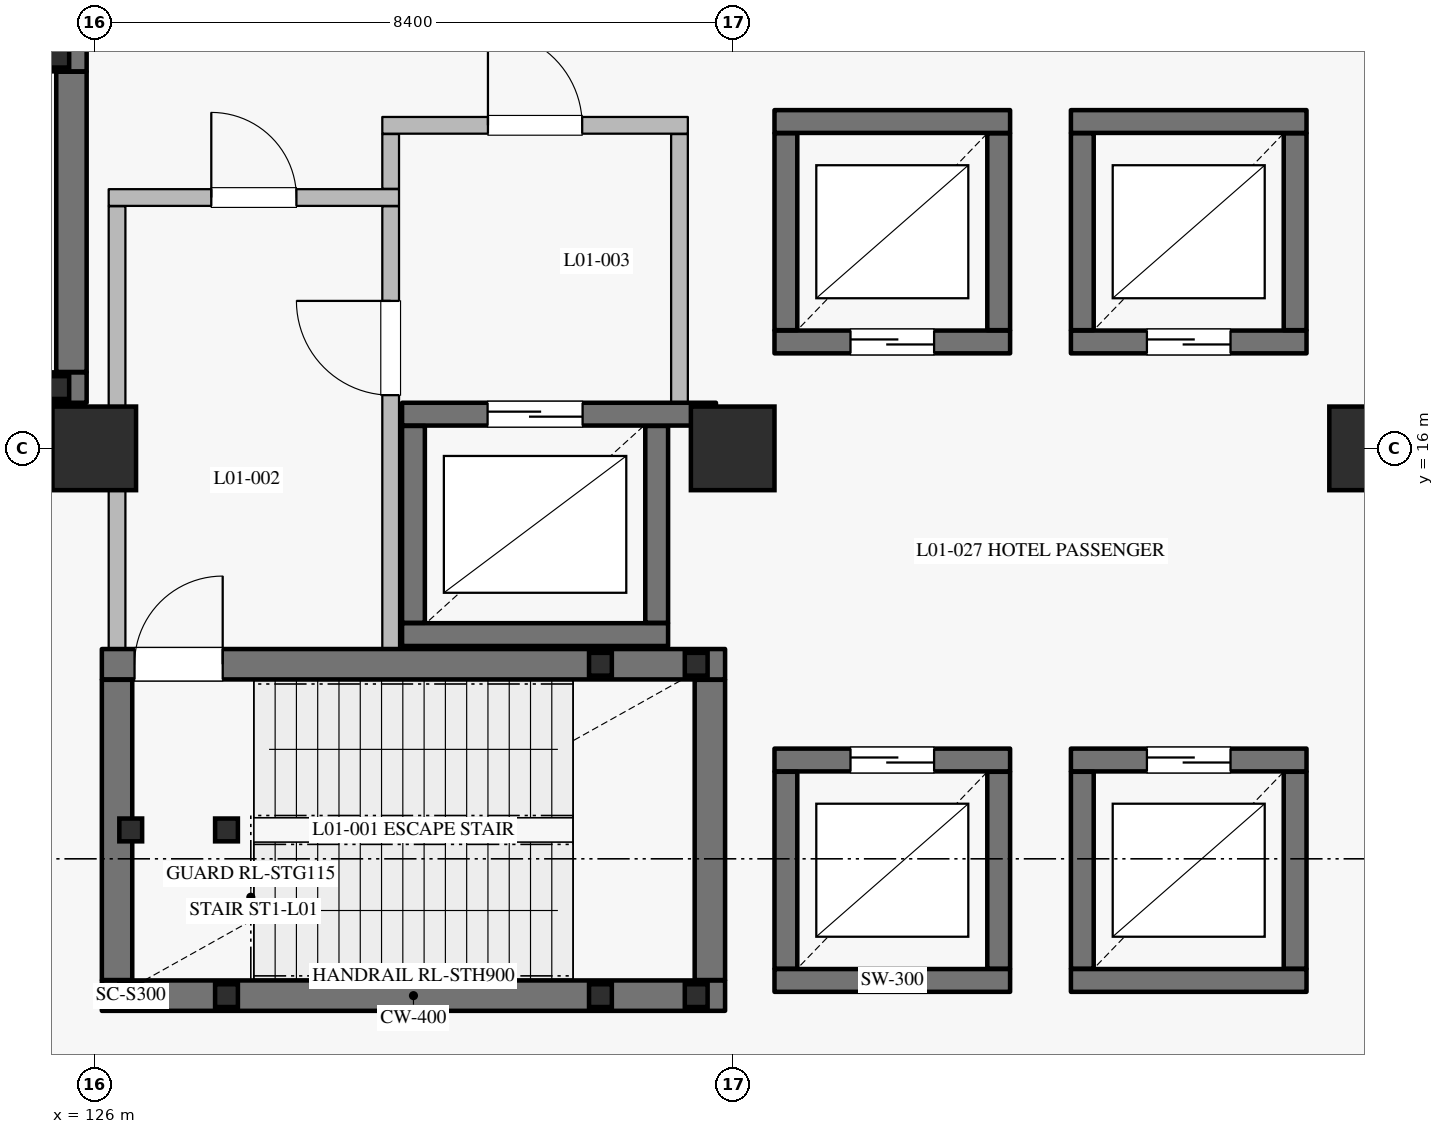
"""IFC4 building model, lengths in metres.
Left out: names, types, materials, properties, quantities, classifications, styles, units other than length and angle.
Written with IfcOpenShell. Run it as: python <this file> out.ifc"""

import sys

from ifc_helpers import new_model, si_unit, direction, frame, frame_2d, origin, origin_2d, place, context, subcontext, project, spatial, rectangle, hollow_rectangle, circle, extrude, element, fill, save


model = new_model("IFC4")
c1 = context("Model", 3, precision=1e-05, world=origin(), true_north=direction((0.0, 1.0)))
c2 = subcontext(c1, "Body", "Model", "MODEL_VIEW")
j1 = project(units=[si_unit("LENGTHUNIT", "METRE"), si_unit("PLANEANGLEUNIT", "RADIAN")], contexts=[c1])
p1 = place(None, origin())
s1 = spatial("IfcSite", under=j1, at=p1, CompositionType="ELEMENT")
p2 = place(p1, origin())
s2 = spatial("IfcBuilding", under=s1, at=p2, CompositionType="ELEMENT")
p3 = place(p2, frame((0.0, 0.0, 6.0)))
s3 = spatial("IfcBuildingStorey", under=s2, at=p3, CompositionType="ELEMENT", Elevation=6.0)
for number, where, z_axis, x_axis in (
    (1, (126.0, 16.0, 0.0), (0.0, 0.0, 1.0), (1.0, 0.0, 0.0)),
    (2, (134.4, 16.0, 0.0), (0.0, 0.0, 1.0), (1.0, 0.0, 0.0)),
    (3, (142.8, 16.0, 0.0), (0.0, 0.0, 1.0), (1.0, 0.0, 0.0)),
):
    element("IfcColumn", number, at=place(p3, frame(where, z_axis=z_axis, x_axis=x_axis)), inside=s3, PredefinedType="COLUMN", context=c2, shape_type="SweptSolid", body=[
        extrude(circle(Radius=0.55, at=origin_2d()), origin(), (0.0, 0.0, 1.0), 5.4),
    ])
p4 = place(p3, frame((134.95, 17.4, 0.0), z_axis=(0.0, 0.0, 1.0), x_axis=(1.0, 0.0, 0.0)))
e4 = element("IfcWall", 4, at=p4, inside=s3, PredefinedType="SHEAR", context=c2, shape_type="SweptSolid", body=[
    extrude(rectangle(XDim=3.1, YDim=0.3, at=frame_2d((1.55, 0.0))), origin(), (0.0, 0.0, 1.0), 5.045),
])
p5 = place(p4, frame((1.0, 0.0, 0.0)))
e5 = element("IfcOpeningElement", 5, at=p5, cuts=e4, PredefinedType="OPENING", context=c2, shape_type="SweptSolid", body=[
    extrude(rectangle(XDim=1.1, YDim=2.2, at=frame_2d((0.55, 1.1))), frame((0.0, 0.16, 0.0), z_axis=(0.0, -1.0, 0.0), x_axis=(1.0, 0.0, 0.0)), (0.0, 0.0, 1.0), 0.32),
])
p6 = place(p3, frame((137.9, 17.555, 0.0), z_axis=(0.0, 0.0, 1.0), x_axis=(0.0, 1.0, 0.0)))
e6 = element("IfcWall", 6, at=p6, inside=s3, PredefinedType="SHEAR", context=c2, shape_type="SweptSolid", body=[
    extrude(rectangle(XDim=2.59, YDim=0.3, at=frame_2d((1.295, 0.0))), origin(), (0.0, 0.0, 1.0), 5.045),
])
p7 = place(p3, frame((138.05, 20.3, 0.0), z_axis=(0.0, 0.0, 1.0), x_axis=(-1.0, 0.0, 0.0)))
e7 = element("IfcWall", 7, at=p7, inside=s3, PredefinedType="SHEAR", context=c2, shape_type="SweptSolid", body=[
    extrude(rectangle(XDim=3.1, YDim=0.3, at=frame_2d((1.55, 0.0))), origin(), (0.0, 0.0, 1.0), 5.045),
])
p8 = place(p3, frame((135.1, 20.145, 0.0), z_axis=(0.0, 0.0, 1.0), x_axis=(0.0, -1.0, 0.0)))
e8 = element("IfcWall", 8, at=p8, inside=s3, PredefinedType="SHEAR", context=c2, shape_type="SweptSolid", body=[
    extrude(rectangle(XDim=2.59, YDim=0.3, at=frame_2d((1.295, 0.0))), origin(), (0.0, 0.0, 1.0), 5.045),
])
p9 = place(p3, frame((138.85, 17.4, 0.0), z_axis=(0.0, 0.0, 1.0), x_axis=(1.0, 0.0, 0.0)))
e9 = element("IfcWall", 9, at=p9, inside=s3, PredefinedType="SHEAR", context=c2, shape_type="SweptSolid", body=[
    extrude(rectangle(XDim=3.1, YDim=0.3, at=frame_2d((1.55, 0.0))), origin(), (0.0, 0.0, 1.0), 5.045),
])
p10 = place(p9, frame((1.0, 0.0, 0.0)))
e10 = element("IfcOpeningElement", 10, at=p10, cuts=e9, PredefinedType="OPENING", context=c2, shape_type="SweptSolid", body=[
    extrude(rectangle(XDim=1.1, YDim=2.2, at=frame_2d((0.55, 1.1))), frame((0.0, 0.16, 0.0), z_axis=(0.0, -1.0, 0.0), x_axis=(1.0, 0.0, 0.0)), (0.0, 0.0, 1.0), 0.32),
])
p11 = place(p3, frame((141.8, 17.555, 0.0), z_axis=(0.0, 0.0, 1.0), x_axis=(0.0, 1.0, 0.0)))
e11 = element("IfcWall", 11, at=p11, inside=s3, PredefinedType="SHEAR", context=c2, shape_type="SweptSolid", body=[
    extrude(rectangle(XDim=2.59, YDim=0.3, at=frame_2d((1.295, 0.0))), origin(), (0.0, 0.0, 1.0), 5.045),
])
p12 = place(p3, frame((141.95, 20.3, 0.0), z_axis=(0.0, 0.0, 1.0), x_axis=(-1.0, 0.0, 0.0)))
e12 = element("IfcWall", 12, at=p12, inside=s3, PredefinedType="SHEAR", context=c2, shape_type="SweptSolid", body=[
    extrude(rectangle(XDim=3.1, YDim=0.3, at=frame_2d((1.55, 0.0))), origin(), (0.0, 0.0, 1.0), 5.045),
])
p13 = place(p3, frame((139.0, 20.145, 0.0), z_axis=(0.0, 0.0, 1.0), x_axis=(0.0, -1.0, 0.0)))
e13 = element("IfcWall", 13, at=p13, inside=s3, PredefinedType="SHEAR", context=c2, shape_type="SweptSolid", body=[
    extrude(rectangle(XDim=2.59, YDim=0.3, at=frame_2d((1.295, 0.0))), origin(), (0.0, 0.0, 1.0), 5.045),
])
p14 = place(p3, frame((134.95, 9.0, 0.0), z_axis=(0.0, 0.0, 1.0), x_axis=(1.0, 0.0, 0.0)))
e14 = element("IfcWall", 14, at=p14, inside=s3, PredefinedType="SHEAR", context=c2, shape_type="SweptSolid", body=[
    extrude(rectangle(XDim=3.1, YDim=0.3, at=frame_2d((1.55, 0.0))), origin(), (0.0, 0.0, 1.0), 5.045),
])
p15 = place(p3, frame((137.9, 9.155, 0.0), z_axis=(0.0, 0.0, 1.0), x_axis=(0.0, 1.0, 0.0)))
e15 = element("IfcWall", 15, at=p15, inside=s3, PredefinedType="SHEAR", context=c2, shape_type="SweptSolid", body=[
    extrude(rectangle(XDim=2.59, YDim=0.3, at=frame_2d((1.295, 0.0))), origin(), (0.0, 0.0, 1.0), 5.045),
])
p16 = place(p3, frame((138.05, 11.9, 0.0), z_axis=(0.0, 0.0, 1.0), x_axis=(-1.0, 0.0, 0.0)))
e16 = element("IfcWall", 16, at=p16, inside=s3, PredefinedType="SHEAR", context=c2, shape_type="SweptSolid", body=[
    extrude(rectangle(XDim=3.1, YDim=0.3, at=frame_2d((1.55, 0.0))), origin(), (0.0, 0.0, 1.0), 5.045),
])
p17 = place(p16, frame((1.0, 0.0, 0.0)))
e17 = element("IfcOpeningElement", 17, at=p17, cuts=e16, PredefinedType="OPENING", context=c2, shape_type="SweptSolid", body=[
    extrude(rectangle(XDim=1.1, YDim=2.2, at=frame_2d((0.55, 1.1))), frame((0.0, 0.16, 0.0), z_axis=(0.0, -1.0, 0.0), x_axis=(1.0, 0.0, 0.0)), (0.0, 0.0, 1.0), 0.32),
])
p18 = place(p3, frame((135.1, 11.745, 0.0), z_axis=(0.0, 0.0, 1.0), x_axis=(0.0, -1.0, 0.0)))
e18 = element("IfcWall", 18, at=p18, inside=s3, PredefinedType="SHEAR", context=c2, shape_type="SweptSolid", body=[
    extrude(rectangle(XDim=2.59, YDim=0.3, at=frame_2d((1.295, 0.0))), origin(), (0.0, 0.0, 1.0), 5.045),
])
p19 = place(p3, frame((138.85, 9.0, 0.0), z_axis=(0.0, 0.0, 1.0), x_axis=(1.0, 0.0, 0.0)))
e19 = element("IfcWall", 19, at=p19, inside=s3, PredefinedType="SHEAR", context=c2, shape_type="SweptSolid", body=[
    extrude(rectangle(XDim=3.1, YDim=0.3, at=frame_2d((1.55, 0.0))), origin(), (0.0, 0.0, 1.0), 5.045),
])
p20 = place(p3, frame((141.8, 9.155, 0.0), z_axis=(0.0, 0.0, 1.0), x_axis=(0.0, 1.0, 0.0)))
e20 = element("IfcWall", 20, at=p20, inside=s3, PredefinedType="SHEAR", context=c2, shape_type="SweptSolid", body=[
    extrude(rectangle(XDim=2.59, YDim=0.3, at=frame_2d((1.295, 0.0))), origin(), (0.0, 0.0, 1.0), 5.045),
])
p21 = place(p3, frame((141.95, 11.9, 0.0), z_axis=(0.0, 0.0, 1.0), x_axis=(-1.0, 0.0, 0.0)))
e21 = element("IfcWall", 21, at=p21, inside=s3, PredefinedType="SHEAR", context=c2, shape_type="SweptSolid", body=[
    extrude(rectangle(XDim=3.1, YDim=0.3, at=frame_2d((1.55, 0.0))), origin(), (0.0, 0.0, 1.0), 5.045),
])
p22 = place(p21, frame((1.0, 0.0, 0.0)))
e22 = element("IfcOpeningElement", 22, at=p22, cuts=e21, PredefinedType="OPENING", context=c2, shape_type="SweptSolid", body=[
    extrude(rectangle(XDim=1.1, YDim=2.2, at=frame_2d((0.55, 1.1))), frame((0.0, 0.16, 0.0), z_axis=(0.0, -1.0, 0.0), x_axis=(1.0, 0.0, 0.0)), (0.0, 0.0, 1.0), 0.32),
])
p23 = place(p3, frame((139.0, 11.745, 0.0), z_axis=(0.0, 0.0, 1.0), x_axis=(0.0, -1.0, 0.0)))
e23 = element("IfcWall", 23, at=p23, inside=s3, PredefinedType="SHEAR", context=c2, shape_type="SweptSolid", body=[
    extrude(rectangle(XDim=2.59, YDim=0.3, at=frame_2d((1.295, 0.0))), origin(), (0.0, 0.0, 1.0), 5.045),
])
p24 = place(p3, frame((130.05, 13.55, 0.0), z_axis=(0.0, 0.0, 1.0), x_axis=(1.0, 0.0, 0.0)))
e24 = element("IfcWall", 24, at=p24, inside=s3, PredefinedType="SHEAR", context=c2, shape_type="SweptSolid", body=[
    extrude(rectangle(XDim=3.5, YDim=0.3, at=frame_2d((1.75, 0.0))), origin(), (0.0, 0.0, 1.0), 5.045),
])
p25 = place(p3, frame((133.4, 13.705, 0.0), z_axis=(0.0, 0.0, 1.0), x_axis=(0.0, 1.0, 0.0)))
e25 = element("IfcWall", 25, at=p25, inside=s3, PredefinedType="SHEAR", context=c2, shape_type="SweptSolid", body=[
    extrude(rectangle(XDim=2.59, YDim=0.3, at=frame_2d((1.295, 0.0))), origin(), (0.0, 0.0, 1.0), 5.045),
])
p26 = place(p3, frame((134.18, 16.45, 0.0), z_axis=(0.0, 0.0, 1.0), x_axis=(-1.0, 0.0, 0.0)))
e26 = element("IfcWall", 26, at=p26, inside=s3, PredefinedType="SHEAR", context=c2, shape_type="SweptSolid", body=[
    extrude(rectangle(XDim=4.13, YDim=0.3, at=frame_2d((2.065, 0.0))), origin(), (0.0, 0.0, 1.0), 5.045),
])
p27 = place(p26, frame((1.755, 0.0, 0.0)))
e27 = element("IfcOpeningElement", 27, at=p27, cuts=e26, PredefinedType="OPENING", context=c2, shape_type="SweptSolid", body=[
    extrude(rectangle(XDim=1.25, YDim=2.25, at=frame_2d((0.625, 1.125))), frame((0.0, 0.16, 0.0), z_axis=(0.0, -1.0, 0.0), x_axis=(1.0, 0.0, 0.0)), (0.0, 0.0, 1.0), 0.32),
])
p28 = place(p3, frame((130.2, 16.295, 0.0), z_axis=(0.0, 0.0, 1.0), x_axis=(0.0, -1.0, 0.0)))
e28 = element("IfcWall", 28, at=p28, inside=s3, PredefinedType="SHEAR", context=c2, shape_type="SweptSolid", body=[
    extrude(rectangle(XDim=2.59, YDim=0.3, at=frame_2d((1.295, 0.0))), origin(), (0.0, 0.0, 1.0), 5.045),
])
p29 = place(p3, frame((126.1, 8.8, 0.0), z_axis=(0.0, 0.0, 1.0), x_axis=(1.0, 0.0, 0.0)))
e29 = element("IfcWall", 29, at=p29, inside=s3, PredefinedType="SHEAR", context=c2, shape_type="SweptSolid", body=[
    extrude(rectangle(XDim=8.2, YDim=0.4, at=frame_2d((4.1, 0.0))), origin(), (0.0, 0.0, 1.0), 5.045),
])
p30 = place(p3, frame((134.1, 9.005, 0.0), z_axis=(0.0, 0.0, 1.0), x_axis=(0.0, 1.0, 0.0)))
e30 = element("IfcWall", 30, at=p30, inside=s3, PredefinedType="SHEAR", context=c2, shape_type="SweptSolid", body=[
    extrude(rectangle(XDim=3.95, YDim=0.4, at=frame_2d((1.975, 0.0))), origin(), (0.0, 0.0, 1.0), 5.045),
])
p31 = place(p3, frame((126.1, 13.16, 0.0), z_axis=(0.0, 0.0, 1.0), x_axis=(1.0, 0.0, 0.0)))
e31 = element("IfcWall", 31, at=p31, inside=s3, PredefinedType="SHEAR", context=c2, shape_type="SweptSolid", body=[
    extrude(rectangle(XDim=8.2, YDim=0.4, at=frame_2d((4.1, 0.0))), origin(), (0.0, 0.0, 1.0), 5.045),
])
p32 = place(p31, frame((0.43, 0.0, 0.0)))
e32 = element("IfcOpeningElement", 32, at=p32, cuts=e31, PredefinedType="OPENING", context=c2, shape_type="SweptSolid", body=[
    extrude(rectangle(XDim=1.16, YDim=2.2, at=frame_2d((0.58, 1.1))), frame((0.0, 0.21, 0.0), z_axis=(0.0, -1.0, 0.0), x_axis=(1.0, 0.0, 0.0)), (0.0, 0.0, 1.0), 0.42),
])
p33 = place(p3, frame((126.3, 9.005, 0.0), z_axis=(0.0, 0.0, 1.0), x_axis=(0.0, 1.0, 0.0)))
e33 = element("IfcWall", 33, at=p33, inside=s3, PredefinedType="SHEAR", context=c2, shape_type="SweptSolid", body=[
    extrude(rectangle(XDim=3.95, YDim=0.4, at=frame_2d((1.975, 0.0))), origin(), (0.0, 0.0, 1.0), 5.045),
])
p34 = place(p3, frame((126.3, 13.365, 0.0), z_axis=(0.0, 0.0, 1.0), x_axis=(0.0, 1.0, 0.0)))
e34 = element("IfcWall", 34, at=p34, inside=s3, PredefinedType="PARTITIONING", context=c2, shape_type="SweptSolid", body=[
    extrude(rectangle(XDim=5.82, YDim=0.22, at=frame_2d((2.91, 0.0))), origin(), (0.0, 0.0, 1.0), 3.45),
])
p35 = place(p3, frame((126.19, 19.3, 0.0), z_axis=(0.0, 0.0, 1.0), x_axis=(1.0, 0.0, 0.0)))
e35 = element("IfcWall", 35, at=p35, inside=s3, PredefinedType="PARTITIONING", context=c2, shape_type="SweptSolid", body=[
    extrude(rectangle(XDim=3.82, YDim=0.22, at=frame_2d((1.91, 0.0))), origin(), (0.0, 0.0, 1.0), 5.045),
])
p36 = place(p35, frame((1.35, 0.0, 0.0)))
e36 = element("IfcOpeningElement", 36, at=p36, cuts=e35, PredefinedType="OPENING", context=c2, shape_type="SweptSolid", body=[
    extrude(rectangle(XDim=1.12, YDim=2.2, at=frame_2d((0.56, 1.1))), frame((0.0, 0.12, 0.0), z_axis=(0.0, -1.0, 0.0), x_axis=(1.0, 0.0, 0.0)), (0.0, 0.0, 1.0), 0.24),
])
p37 = place(p3, frame((129.9, 13.365, 0.0), z_axis=(0.0, 0.0, 1.0), x_axis=(0.0, 1.0, 0.0)))
e37 = element("IfcWall", 37, at=p37, inside=s3, PredefinedType="PARTITIONING", context=c2, shape_type="SweptSolid", body=[
    extrude(rectangle(XDim=5.82, YDim=0.22, at=frame_2d((2.91, 0.0))), origin(), (0.0, 0.0, 1.0), 5.045),
])
p38 = place(p37, frame((3.335, 0.0, 0.0)))
e38 = element("IfcOpeningElement", 38, at=p38, cuts=e37, PredefinedType="OPENING", context=c2, shape_type="SweptSolid", body=[
    extrude(rectangle(XDim=1.24, YDim=2.2, at=frame_2d((0.62, 1.1))), frame((0.0, 0.12, 0.0), z_axis=(0.0, -1.0, 0.0), x_axis=(1.0, 0.0, 0.0)), (0.0, 0.0, 1.0), 0.24),
])
p39 = place(p3, frame((129.9, 19.415, 0.0), z_axis=(0.0, 0.0, 1.0), x_axis=(0.0, 1.0, 0.0)))
e39 = element("IfcWall", 39, at=p39, inside=s3, PredefinedType="PARTITIONING", context=c2, shape_type="SweptSolid", body=[
    extrude(rectangle(XDim=0.72, YDim=0.22, at=frame_2d((0.36, 0.0))), origin(), (0.0, 0.0, 1.0), 5.045),
])
p40 = place(p3, frame((133.7, 16.605, 0.0), z_axis=(0.0, 0.0, 1.0), x_axis=(0.0, 1.0, 0.0)))
e40 = element("IfcWall", 40, at=p40, inside=s3, PredefinedType="PARTITIONING", context=c2, shape_type="SweptSolid", body=[
    extrude(rectangle(XDim=3.53, YDim=0.22, at=frame_2d((1.765, 0.0))), origin(), (0.0, 0.0, 1.0), 5.045),
])
p41 = place(p3, frame((129.79, 20.25, 0.0), z_axis=(0.0, 0.0, 1.0), x_axis=(1.0, 0.0, 0.0)))
e41 = element("IfcWall", 41, at=p41, inside=s3, PredefinedType="PARTITIONING", context=c2, shape_type="SweptSolid", body=[
    extrude(rectangle(XDim=4.02, YDim=0.22, at=frame_2d((2.01, 0.0))), origin(), (0.0, 0.0, 1.0), 5.045),
])
p42 = place(p41, frame((1.39, 0.0, 0.0)))
e42 = element("IfcOpeningElement", 42, at=p42, cuts=e41, PredefinedType="OPENING", context=c2, shape_type="SweptSolid", body=[
    extrude(rectangle(XDim=1.24, YDim=2.2, at=frame_2d((0.62, 1.1))), frame((0.0, 0.12, 0.0), z_axis=(0.0, -1.0, 0.0), x_axis=(1.0, 0.0, 0.0)), (0.0, 0.0, 1.0), 0.24),
])
for number, where, z_axis, x_axis in (
    (43, (126.48, 8.8, 0.0), (0.0, 0.0, 1.0), (1.0, 0.0, 0.0)),
    (44, (126.48, 10.98, 0.0), (0.0, 0.0, 1.0), (1.0, 0.0, 0.0)),
    (45, (127.74, 8.8, 0.0), (0.0, 0.0, 1.0), (1.0, 0.0, 0.0)),
    (46, (127.74, 10.98, 0.0), (0.0, 0.0, 1.0), (1.0, 0.0, 0.0)),
):
    element("IfcColumn", number, at=place(p3, frame(where, z_axis=z_axis, x_axis=x_axis)), inside=s3, PredefinedType="COLUMN", context=c2, shape_type="SweptSolid", body=[
        extrude(hollow_rectangle(XDim=0.3, YDim=0.3, WallThickness=0.012, at=origin_2d()), origin(), (0.0, 0.0, 1.0), 5.22),
    ])
for number, where, z_axis, x_axis in (
    (47, (132.66, 8.8, -3.0), (0.0, 0.0, 1.0), (1.0, 0.0, 0.0)),
    (48, (132.66, 13.16, -3.0), (0.0, 0.0, 1.0), (1.0, 0.0, 0.0)),
    (49, (133.92, 8.8, -3.0), (0.0, 0.0, 1.0), (1.0, 0.0, 0.0)),
    (50, (133.92, 13.16, -3.0), (0.0, 0.0, 1.0), (1.0, 0.0, 0.0)),
):
    element("IfcColumn", number, at=place(p3, frame(where, z_axis=z_axis, x_axis=x_axis)), inside=s3, PredefinedType="COLUMN", context=c2, shape_type="SweptSolid", body=[
        extrude(hollow_rectangle(XDim=0.3, YDim=0.3, WallThickness=0.012, at=origin_2d()), origin(), (0.0, 0.0, 1.0), 5.52),
    ])
p43 = place(p3, frame((117.7, 16.8, 0.0), z_axis=(0.0, 0.0, 1.0), x_axis=(1.0, 0.0, 0.0)))
e51 = element("IfcWall", 51, at=p43, inside=s3, PredefinedType="SHEAR", context=c2, shape_type="SweptSolid", body=[
    extrude(rectangle(XDim=8.2, YDim=0.4, at=frame_2d((4.1, 0.0))), origin(), (0.0, 0.0, 1.0), 5.045),
])
p44 = place(p3, frame((125.7, 17.005, 0.0), z_axis=(0.0, 0.0, 1.0), x_axis=(0.0, 1.0, 0.0)))
e52 = element("IfcWall", 52, at=p44, inside=s3, PredefinedType="SHEAR", context=c2, shape_type="SweptSolid", body=[
    extrude(rectangle(XDim=3.95, YDim=0.4, at=frame_2d((1.975, 0.0))), origin(), (0.0, 0.0, 1.0), 5.045),
])
p45 = place(p3, frame((117.7, 21.16, 0.0), z_axis=(0.0, 0.0, 1.0), x_axis=(1.0, 0.0, 0.0)))
e53 = element("IfcWall", 53, at=p45, inside=s3, PredefinedType="SHEAR", context=c2, shape_type="SweptSolid", body=[
    extrude(rectangle(XDim=8.2, YDim=0.4, at=frame_2d((4.1, 0.0))), origin(), (0.0, 0.0, 1.0), 5.045),
])
p46 = place(p45, frame((0.43, 0.0, 0.0)))
e54 = element("IfcOpeningElement", 54, at=p46, cuts=e53, PredefinedType="OPENING", context=c2, shape_type="SweptSolid", body=[
    extrude(rectangle(XDim=1.16, YDim=2.2, at=frame_2d((0.58, 1.1))), frame((0.0, 0.21, 0.0), z_axis=(0.0, -1.0, 0.0), x_axis=(1.0, 0.0, 0.0)), (0.0, 0.0, 1.0), 0.42),
])
for number, where, z_axis, x_axis in (
    (55, (125.52, 16.8, -3.0), (0.0, 0.0, 1.0), (1.0, 0.0, 0.0)),
    (56, (125.52, 21.16, -3.0), (0.0, 0.0, 1.0), (1.0, 0.0, 0.0)),
):
    element("IfcColumn", number, at=place(p3, frame(where, z_axis=z_axis, x_axis=x_axis)), inside=s3, PredefinedType="COLUMN", context=c2, shape_type="SweptSolid", body=[
        extrude(hollow_rectangle(XDim=0.3, YDim=0.3, WallThickness=0.012, at=origin_2d()), origin(), (0.0, 0.0, 1.0), 5.52),
    ])
p47 = place(p5, origin())
e57 = element("IfcDoor", 57, at=p47, inside=s3, OperationType="DOUBLE_DOOR_SLIDING", PredefinedType="DOOR", context=c2, shape_type="SweptSolid", body=[
    extrude(rectangle(XDim=1.1, YDim=2.2, at=frame_2d((0.55, 1.1))), frame((0.0, 0.025, 0.0), z_axis=(0.0, -1.0, 0.0), x_axis=(1.0, 0.0, 0.0)), (0.0, 0.0, 1.0), 0.05),
])
fill(e5, e57)
p48 = place(p10, origin())
e58 = element("IfcDoor", 58, at=p48, inside=s3, OperationType="DOUBLE_DOOR_SLIDING", PredefinedType="DOOR", context=c2, shape_type="SweptSolid", body=[
    extrude(rectangle(XDim=1.1, YDim=2.2, at=frame_2d((0.55, 1.1))), frame((0.0, 0.025, 0.0), z_axis=(0.0, -1.0, 0.0), x_axis=(1.0, 0.0, 0.0)), (0.0, 0.0, 1.0), 0.05),
])
fill(e10, e58)
p49 = place(p17, origin())
e59 = element("IfcDoor", 59, at=p49, inside=s3, OperationType="DOUBLE_DOOR_SLIDING", PredefinedType="DOOR", context=c2, shape_type="SweptSolid", body=[
    extrude(rectangle(XDim=1.1, YDim=2.2, at=frame_2d((0.55, 1.1))), frame((0.0, 0.025, 0.0), z_axis=(0.0, -1.0, 0.0), x_axis=(1.0, 0.0, 0.0)), (0.0, 0.0, 1.0), 0.05),
])
fill(e17, e59)
p50 = place(p22, origin())
e60 = element("IfcDoor", 60, at=p50, inside=s3, OperationType="DOUBLE_DOOR_SLIDING", PredefinedType="DOOR", context=c2, shape_type="SweptSolid", body=[
    extrude(rectangle(XDim=1.1, YDim=2.2, at=frame_2d((0.55, 1.1))), frame((0.0, 0.025, 0.0), z_axis=(0.0, -1.0, 0.0), x_axis=(1.0, 0.0, 0.0)), (0.0, 0.0, 1.0), 0.05),
])
fill(e22, e60)
p51 = place(p27, origin())
e61 = element("IfcDoor", 61, at=p51, inside=s3, OperationType="DOUBLE_DOOR_SLIDING", PredefinedType="DOOR", context=c2, shape_type="SweptSolid", body=[
    extrude(rectangle(XDim=1.25, YDim=2.25, at=frame_2d((0.625, 1.125))), frame((0.0, 0.025, 0.0), z_axis=(0.0, -1.0, 0.0), x_axis=(1.0, 0.0, 0.0)), (0.0, 0.0, 1.0), 0.05),
])
fill(e27, e61)
p52 = place(p32, origin())
e62 = element("IfcDoor", 62, at=p52, inside=s3, OperationType="SINGLE_SWING_RIGHT", PredefinedType="DOOR", context=c2, shape_type="SweptSolid", body=[
    extrude(rectangle(XDim=1.16, YDim=2.2, at=frame_2d((0.58, 1.1))), frame((0.0, 0.025, 0.0), z_axis=(0.0, -1.0, 0.0), x_axis=(1.0, 0.0, 0.0)), (0.0, 0.0, 1.0), 0.05),
])
fill(e32, e62)
p53 = place(p36, origin())
e63 = element("IfcDoor", 63, at=p53, inside=s3, OperationType="SINGLE_SWING_LEFT", PredefinedType="DOOR", context=c2, shape_type="SweptSolid", body=[
    extrude(rectangle(XDim=1.12, YDim=2.2, at=frame_2d((0.56, 1.1))), frame((0.0, 0.025, 0.0), z_axis=(0.0, -1.0, 0.0), x_axis=(1.0, 0.0, 0.0)), (0.0, 0.0, 1.0), 0.05),
])
fill(e36, e63)
p54 = place(p38, origin())
e64 = element("IfcDoor", 64, at=p54, inside=s3, OperationType="SINGLE_SWING_RIGHT", PredefinedType="DOOR", context=c2, shape_type="SweptSolid", body=[
    extrude(rectangle(XDim=1.24, YDim=2.2, at=frame_2d((0.62, 1.1))), frame((0.0, 0.025, 0.0), z_axis=(0.0, -1.0, 0.0), x_axis=(1.0, 0.0, 0.0)), (0.0, 0.0, 1.0), 0.05),
])
fill(e38, e64)
p55 = place(p42, origin())
e65 = element("IfcDoor", 65, at=p55, inside=s3, OperationType="SINGLE_SWING_LEFT", PredefinedType="DOOR", context=c2, shape_type="SweptSolid", body=[
    extrude(rectangle(XDim=1.24, YDim=2.2, at=frame_2d((0.62, 1.1))), frame((0.0, 0.025, 0.0), z_axis=(0.0, -1.0, 0.0), x_axis=(1.0, 0.0, 0.0)), (0.0, 0.0, 1.0), 0.05),
])
fill(e42, e65)
save(model, sys.argv[1])
